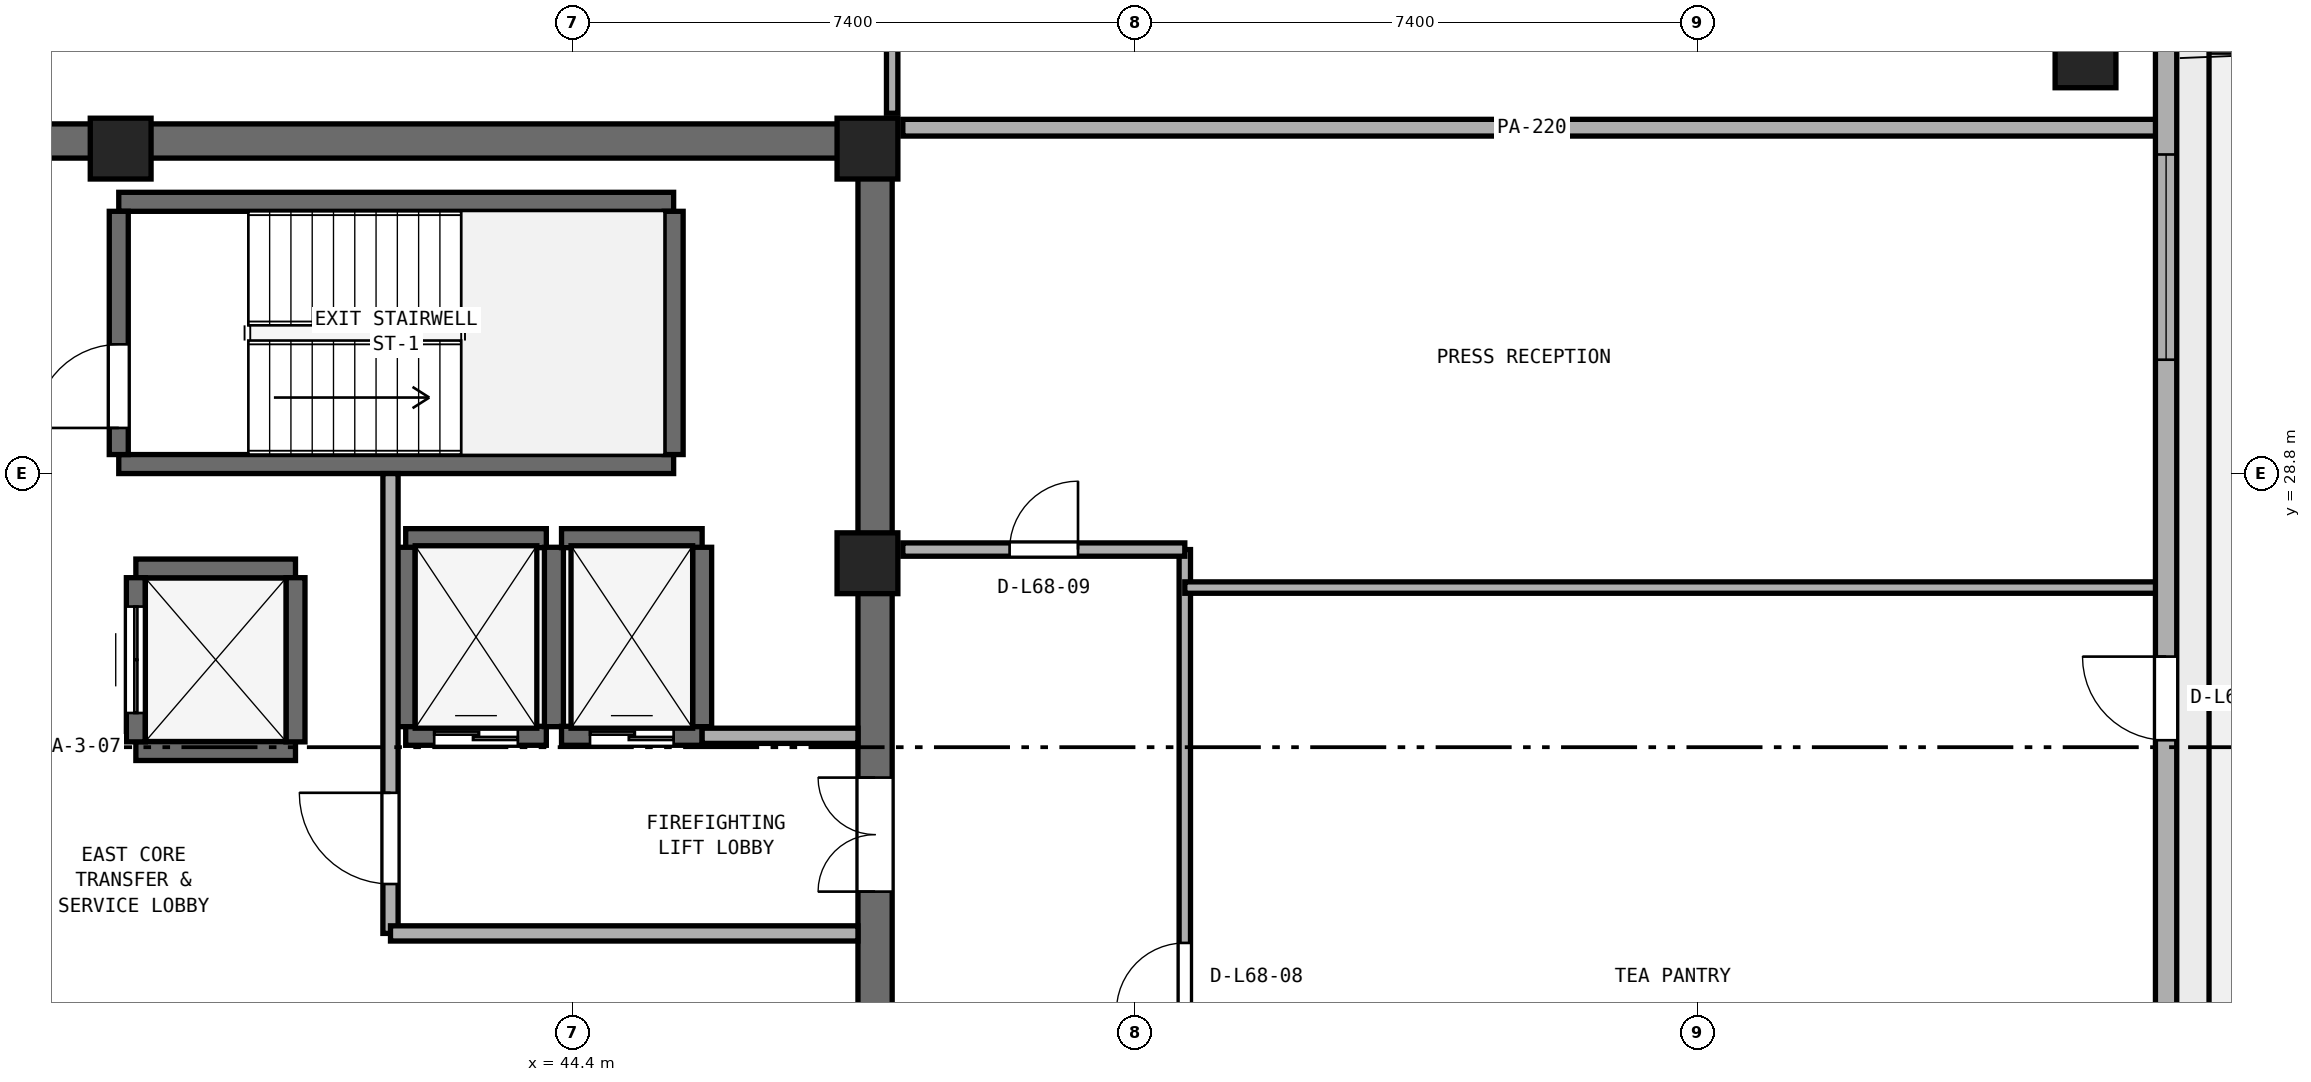
"""IFC4 building model, lengths in metres.
Left out: names, types, materials, properties, quantities, classifications, styles, units other than length and angle.
Written with IfcOpenShell. Run it as: python <this file> out.ifc"""

import sys

from ifc_helpers import new_model, si_unit, direction, frame, frame_2d, origin, origin_2d, place, context, subcontext, project, spatial, rectangle, extrude, element, fill, save


model = new_model("IFC4")
c1 = context("Model", 3, precision=1e-05, world=origin(), true_north=direction((0.0, 1.0)))
c2 = subcontext(c1, "Body", "Model", "MODEL_VIEW")
j1 = project(units=[si_unit("LENGTHUNIT", "METRE"), si_unit("PLANEANGLEUNIT", "RADIAN")], contexts=[c1])
p1 = place(None, origin())
s1 = spatial("IfcSite", under=j1, at=p1, CompositionType="ELEMENT")
p2 = place(p1, origin())
s2 = spatial("IfcBuilding", under=s1, at=p2, CompositionType="ELEMENT")
p3 = place(p2, frame((0.0, 0.0, 266.8)))
s3 = spatial("IfcBuildingStorey", under=s2, at=p3, CompositionType="ELEMENT", Elevation=266.8)
p4 = place(p3, frame((25.4, 33.175, 0.0), z_axis=(0.0, 0.0, 1.0), x_axis=(1.0, 0.0, 0.0)))
e1 = element("IfcWall", 1, at=p4, inside=s3, PredefinedType="SHEAR", context=c2, shape_type="SweptSolid", body=[
    extrude(rectangle(XDim=23.2, YDim=0.45, at=frame_2d((11.6, 0.0))), origin(), (0.0, 0.0, 1.0), 3.51),
])
p5 = place(p3, frame((48.375, 17.45, 0.0), z_axis=(0.0, 0.0, 1.0), x_axis=(0.0, 1.0, 0.0)))
e2 = element("IfcWall", 2, at=p5, inside=s3, PredefinedType="SHEAR", context=c2, shape_type="SweptSolid", body=[
    extrude(rectangle(XDim=15.5, YDim=0.45, at=frame_2d((7.75, 0.0))), origin(), (0.0, 0.0, 1.0), 3.51),
])
p6 = place(p5, frame((5.85, 0.0, 0.0)))
e3 = element("IfcOpeningElement", 3, at=p6, cuts=e2, PredefinedType="OPENING", context=c2, shape_type="SweptSolid", body=[
    extrude(rectangle(XDim=1.5, YDim=2.15, at=frame_2d((0.75, 1.075))), frame((0.0, 0.235, 0.0), z_axis=(0.0, -1.0, 0.0), x_axis=(1.0, 0.0, 0.0)), (0.0, 0.0, 1.0), 0.47),
])
for number, where, z_axis, x_axis in (
    (4, (48.275, 27.62, 0.0), (0.0, 0.0, 1.0), (1.0, 0.0, 0.0)),
    (5, (48.275, 33.075, 0.0), (0.0, 0.0, 1.0), (1.0, 0.0, 0.0)),
    (6, (38.45, 33.075, 0.0), (0.0, 0.0, 1.0), (1.0, 0.0, 0.0)),
):
    element("IfcColumn", number, at=place(p3, frame(where, z_axis=z_axis, x_axis=x_axis)), inside=s3, PredefinedType="PILASTER", context=c2, shape_type="SweptSolid", body=[
        extrude(rectangle(XDim=0.8, YDim=0.8, at=origin_2d()), origin(), (0.0, 0.0, 1.0), 3.8),
    ])
p7 = place(p3, frame((64.3, 34.276, 0.0), z_axis=(0.0, 0.0, 1.0), x_axis=(1.0, 0.0, 0.0)))
e7 = element("IfcColumn", 7, at=p7, inside=s3, PredefinedType="COLUMN", context=c2, shape_type="SweptSolid", body=[
    extrude(rectangle(XDim=0.8, YDim=0.8, at=origin_2d()), origin(), (0.0, 0.0, 1.0), 3.8),
])
for number, where, z_axis, x_axis in (
    (8, (38.425, 28.925, 0.0), (0.0, 0.0, 1.0), (1.0, 0.0, 0.0)),
    (9, (38.425, 32.375, 0.0), (0.0, 0.0, 1.0), (1.0, 0.0, 0.0)),
):
    element("IfcWall", number, at=place(p3, frame(where, z_axis=z_axis, x_axis=x_axis)), inside=s3, PredefinedType="SHEAR", context=c2, shape_type="SweptSolid", body=[
        extrude(rectangle(XDim=7.3, YDim=0.25, at=frame_2d((3.65, 0.0))), origin(), (0.0, 0.0, 1.0), 3.51),
    ])
p8 = place(p3, frame((38.425, 29.05, 0.0), z_axis=(0.0, 0.0, 1.0), x_axis=(0.0, 1.0, 0.0)))
e10 = element("IfcWall", 10, at=p8, inside=s3, PredefinedType="SHEAR", context=c2, shape_type="SweptSolid", body=[
    extrude(rectangle(XDim=3.2, YDim=0.25, at=frame_2d((1.6, 0.0))), origin(), (0.0, 0.0, 1.0), 3.51),
])
p9 = place(p8, frame((0.35, 0.0, 0.0)))
e11 = element("IfcOpeningElement", 11, at=p9, cuts=e10, PredefinedType="OPENING", context=c2, shape_type="SweptSolid", body=[
    extrude(rectangle(XDim=1.1, YDim=2.15, at=frame_2d((0.55, 1.075))), frame((0.0, 0.135, 0.0), z_axis=(0.0, -1.0, 0.0), x_axis=(1.0, 0.0, 0.0)), (0.0, 0.0, 1.0), 0.27),
])
p10 = place(p3, frame((45.725, 29.05, 0.0), z_axis=(0.0, 0.0, 1.0), x_axis=(0.0, 1.0, 0.0)))
e12 = element("IfcWall", 12, at=p10, inside=s3, PredefinedType="SHEAR", context=c2, shape_type="SweptSolid", body=[
    extrude(rectangle(XDim=3.2, YDim=0.25, at=frame_2d((1.6, 0.0))), origin(), (0.0, 0.0, 1.0), 3.51),
])
p11 = place(p3, frame((42.2, 25.35, 0.0), z_axis=(0.0, 0.0, 1.0), x_axis=(1.0, 0.0, 0.0)))
e13 = element("IfcWall", 13, at=p11, inside=s3, PredefinedType="SHEAR", context=c2, shape_type="SweptSolid", body=[
    extrude(rectangle(XDim=1.85, YDim=0.25, at=frame_2d((0.925, 0.0))), origin(), (0.0, 0.0, 1.0), 3.51),
])
p12 = place(p11, frame((0.375, 0.0, 0.0)))
e14 = element("IfcOpeningElement", 14, at=p12, cuts=e13, PredefinedType="OPENING", context=c2, shape_type="SweptSolid", body=[
    extrude(rectangle(XDim=1.1, YDim=2.15, at=frame_2d((0.55, 1.075))), frame((0.0, 0.135, 0.0), z_axis=(0.0, -1.0, 0.0), x_axis=(1.0, 0.0, 0.0)), (0.0, 0.0, 1.0), 0.27),
])
p13 = place(p3, frame((42.2, 27.95, 0.0), z_axis=(0.0, 0.0, 1.0), x_axis=(1.0, 0.0, 0.0)))
e15 = element("IfcWall", 15, at=p13, inside=s3, PredefinedType="SHEAR", context=c2, shape_type="SweptSolid", body=[
    extrude(rectangle(XDim=1.85, YDim=0.25, at=frame_2d((0.925, 0.0))), origin(), (0.0, 0.0, 1.0), 3.51),
])
for number, where, z_axis, x_axis in (
    (16, (42.2, 25.47, 0.0), (0.0, 0.0, 1.0), (0.0, 1.0, 0.0)),
    (17, (44.15, 25.47, 0.0), (0.0, 0.0, 1.0), (0.0, 1.0, 0.0)),
):
    element("IfcWall", number, at=place(p3, frame(where, z_axis=z_axis, x_axis=x_axis)), inside=s3, PredefinedType="SHEAR", context=c2, shape_type="SweptSolid", body=[
        extrude(rectangle(XDim=2.36, YDim=0.25, at=frame_2d((1.18, 0.0))), origin(), (0.0, 0.0, 1.0), 3.51),
    ])
p14 = place(p3, frame((44.25, 25.35, 0.0), z_axis=(0.0, 0.0, 1.0), x_axis=(1.0, 0.0, 0.0)))
e18 = element("IfcWall", 18, at=p14, inside=s3, PredefinedType="SHEAR", context=c2, shape_type="SweptSolid", body=[
    extrude(rectangle(XDim=1.85, YDim=0.25, at=frame_2d((0.925, 0.0))), origin(), (0.0, 0.0, 1.0), 3.51),
])
p15 = place(p14, frame((0.375, 0.0, 0.0)))
e19 = element("IfcOpeningElement", 19, at=p15, cuts=e18, PredefinedType="OPENING", context=c2, shape_type="SweptSolid", body=[
    extrude(rectangle(XDim=1.1, YDim=2.15, at=frame_2d((0.55, 1.075))), frame((0.0, 0.135, 0.0), z_axis=(0.0, -1.0, 0.0), x_axis=(1.0, 0.0, 0.0)), (0.0, 0.0, 1.0), 0.27),
])
p16 = place(p3, frame((44.25, 27.95, 0.0), z_axis=(0.0, 0.0, 1.0), x_axis=(1.0, 0.0, 0.0)))
e20 = element("IfcWall", 20, at=p16, inside=s3, PredefinedType="SHEAR", context=c2, shape_type="SweptSolid", body=[
    extrude(rectangle(XDim=1.85, YDim=0.25, at=frame_2d((0.925, 0.0))), origin(), (0.0, 0.0, 1.0), 3.51),
])
p17 = place(p3, frame((46.1, 25.47, 0.0), z_axis=(0.0, 0.0, 1.0), x_axis=(0.0, 1.0, 0.0)))
e21 = element("IfcWall", 21, at=p17, inside=s3, PredefinedType="SHEAR", context=c2, shape_type="SweptSolid", body=[
    extrude(rectangle(XDim=2.36, YDim=0.25, at=frame_2d((1.18, 0.0))), origin(), (0.0, 0.0, 1.0), 3.51),
])
for number, where, z_axis, x_axis in (
    (22, (38.65, 25.15, 0.0), (0.0, 0.0, 1.0), (1.0, 0.0, 0.0)),
    (23, (38.65, 27.55, 0.0), (0.0, 0.0, 1.0), (1.0, 0.0, 0.0)),
):
    element("IfcWall", number, at=place(p3, frame(where, z_axis=z_axis, x_axis=x_axis)), inside=s3, PredefinedType="SHEAR", context=c2, shape_type="SweptSolid", body=[
        extrude(rectangle(XDim=2.1, YDim=0.25, at=frame_2d((1.05, 0.0))), origin(), (0.0, 0.0, 1.0), 3.51),
    ])
p18 = place(p3, frame((38.65, 25.27, 0.0), z_axis=(0.0, 0.0, 1.0), x_axis=(0.0, 1.0, 0.0)))
e24 = element("IfcWall", 24, at=p18, inside=s3, PredefinedType="SHEAR", context=c2, shape_type="SweptSolid", body=[
    extrude(rectangle(XDim=2.16, YDim=0.25, at=frame_2d((1.08, 0.0))), origin(), (0.0, 0.0, 1.0), 3.51),
])
p19 = place(p18, frame((0.38, 0.0, 0.0)))
e25 = element("IfcOpeningElement", 25, at=p19, cuts=e24, PredefinedType="OPENING", context=c2, shape_type="SweptSolid", body=[
    extrude(rectangle(XDim=1.4, YDim=2.2, at=frame_2d((0.7, 1.1))), frame((0.0, 0.135, 0.0), z_axis=(0.0, -1.0, 0.0), x_axis=(1.0, 0.0, 0.0)), (0.0, 0.0, 1.0), 0.27),
])
p20 = place(p3, frame((40.75, 25.27, 0.0), z_axis=(0.0, 0.0, 1.0), x_axis=(0.0, 1.0, 0.0)))
e26 = element("IfcWall", 26, at=p20, inside=s3, PredefinedType="SHEAR", context=c2, shape_type="SweptSolid", body=[
    extrude(rectangle(XDim=2.16, YDim=0.25, at=frame_2d((1.08, 0.0))), origin(), (0.0, 0.0, 1.0), 3.51),
])
p21 = place(p3, frame((42.0, 22.75, 0.0), z_axis=(0.0, 0.0, 1.0), x_axis=(0.0, 1.0, 0.0)))
e27 = element("IfcWall", 27, at=p21, inside=s3, PredefinedType="SOLIDWALL", context=c2, shape_type="SweptSolid", body=[
    extrude(rectangle(XDim=6.05, YDim=0.2, at=frame_2d((3.025, 0.0))), origin(), (0.0, 0.0, 1.0), 3.51),
])
p22 = place(p21, frame((0.65, 0.0, 0.0)))
e28 = element("IfcOpeningElement", 28, at=p22, cuts=e27, PredefinedType="OPENING", context=c2, shape_type="SweptSolid", body=[
    extrude(rectangle(XDim=1.2, YDim=2.15, at=frame_2d((0.6, 1.075))), frame((0.0, 0.11, 0.0), z_axis=(0.0, -1.0, 0.0), x_axis=(1.0, 0.0, 0.0)), (0.0, 0.0, 1.0), 0.22),
])
p23 = place(p3, frame((42.0, 22.75, 0.0), z_axis=(0.0, 0.0, 1.0), x_axis=(1.0, 0.0, 0.0)))
e29 = element("IfcWall", 29, at=p23, inside=s3, PredefinedType="SOLIDWALL", context=c2, shape_type="SweptSolid", body=[
    extrude(rectangle(XDim=6.15, YDim=0.2, at=frame_2d((3.075, 0.0))), origin(), (0.0, 0.0, 1.0), 3.51),
])
p24 = place(p3, frame((46.1, 25.35, 0.0), z_axis=(0.0, 0.0, 1.0), x_axis=(1.0, 0.0, 0.0)))
e30 = element("IfcWall", 30, at=p24, inside=s3, PredefinedType="SOLIDWALL", context=c2, shape_type="SweptSolid", body=[
    extrude(rectangle(XDim=2.05, YDim=0.2, at=frame_2d((1.025, 0.0))), origin(), (0.0, 0.0, 1.0), 3.51),
])
p25 = place(p3, frame((52.45, 13.15, 0.0), z_axis=(0.0, 0.0, 1.0), x_axis=(0.0, 1.0, 0.0)))
e31 = element("IfcWall", 31, at=p25, inside=s3, PredefinedType="PARTITIONING", context=c2, shape_type="SweptSolid", body=[
    extrude(rectangle(XDim=14.65, YDim=0.15, at=frame_2d((7.325, 0.0))), origin(), (0.0, 0.0, 1.0), 3.51),
])
p26 = place(p25, frame((8.575, 0.0, 0.0)))
e32 = element("IfcOpeningElement", 32, at=p26, cuts=e31, PredefinedType="OPENING", context=c2, shape_type="SweptSolid", body=[
    extrude(rectangle(XDim=0.9, YDim=2.1, at=frame_2d((0.45, 1.05))), frame((0.0, 0.085, 0.0), z_axis=(0.0, -1.0, 0.0), x_axis=(1.0, 0.0, 0.0)), (0.0, 0.0, 1.0), 0.17),
])
p27 = place(p3, frame((48.6, 33.54, 0.0), z_axis=(0.0, 0.0, 1.0), x_axis=(0.0, 1.0, 0.0)))
e33 = element("IfcWall", 33, at=p27, inside=s3, PredefinedType="PARTITIONING", context=c2, shape_type="SweptSolid", body=[
    extrude(rectangle(XDim=3.71, YDim=0.15, at=frame_2d((1.855, 0.0))), origin(), (0.0, 0.0, 1.0), 2.893),
])
p28 = place(p3, frame((52.45, 27.3, 0.0), z_axis=(0.0, 0.0, 1.0), x_axis=(1.0, 0.0, 0.0)))
e34 = element("IfcWall", 34, at=p28, inside=s3, PredefinedType="PARTITIONING", context=c2, shape_type="SweptSolid", body=[
    extrude(rectangle(XDim=12.845, YDim=0.15, at=frame_2d((6.422, 0.0))), origin(), (0.0, 0.0, 1.0), 3.51),
])
p29 = place(p3, frame((48.74, 27.8, 0.0), z_axis=(0.0, 0.0, 1.0), x_axis=(1.0, 0.0, 0.0)))
e35 = element("IfcWall", 35, at=p29, inside=s3, PredefinedType="PARTITIONING", context=c2, shape_type="SweptSolid", body=[
    extrude(rectangle(XDim=3.71, YDim=0.175, at=frame_2d((1.855, 0.0))), origin(), (0.0, 0.0, 1.0), 3.51),
])
p30 = place(p29, frame((1.405, 0.0, 0.0)))
e36 = element("IfcOpeningElement", 36, at=p30, cuts=e35, PredefinedType="OPENING", context=c2, shape_type="SweptSolid", body=[
    extrude(rectangle(XDim=0.9, YDim=2.1, at=frame_2d((0.45, 1.05))), frame((0.0, 0.097, 0.0), z_axis=(0.0, -1.0, 0.0), x_axis=(1.0, 0.0, 0.0)), (0.0, 0.0, 1.0), 0.195),
])
p31 = place(p3, frame((48.74, 33.35, 0.0), z_axis=(0.0, 0.0, 1.0), x_axis=(1.0, 0.0, 0.0)))
e37 = element("IfcWall", 37, at=p31, inside=s3, PredefinedType="PARTITIONING", context=c2, shape_type="SweptSolid", body=[
    extrude(rectangle(XDim=16.555, YDim=0.22, at=frame_2d((8.277, 0.0))), origin(), (0.0, 0.0, 1.0), 2.893),
])
p32 = place(p3, frame((65.36, 16.258, 0.0), z_axis=(0.0, 0.0, 1.0), x_axis=(0.0, 1.0, 0.0)))
e38 = element("IfcWall", 38, at=p32, inside=s3, PredefinedType="STANDARD", context=c2, shape_type="SweptSolid", body=[
    extrude(rectangle(XDim=19.168, YDim=0.28, at=frame_2d((9.584, 0.0))), origin(), (0.0, 0.0, 1.0), 3.51),
])
p33 = place(p32, frame((9.034, 0.0, 0.0)))
e39 = element("IfcOpeningElement", 39, at=p33, cuts=e38, PredefinedType="OPENING", context=c2, shape_type="SweptSolid", body=[
    extrude(rectangle(XDim=1.1, YDim=2.2, at=frame_2d((0.55, 1.1))), frame((0.0, 0.15, 0.0), z_axis=(0.0, -1.0, 0.0), x_axis=(1.0, 0.0, 0.0)), (0.0, 0.0, 1.0), 0.3),
])
p34 = place(p32, frame((2.178, 0.0, 0.9)))
e40 = element("IfcOpeningElement", 40, at=p34, cuts=e38, PredefinedType="OPENING", context=c2, shape_type="SweptSolid", body=[
    extrude(rectangle(XDim=2.7, YDim=1.75, at=frame_2d((1.35, 0.875))), frame((0.0, 0.15, 0.0), z_axis=(0.0, -1.0, 0.0), x_axis=(1.0, 0.0, 0.0)), (0.0, 0.0, 1.0), 0.3),
])
p35 = place(p32, frame((14.04, 0.0, 0.9)))
e41 = element("IfcOpeningElement", 41, at=p35, cuts=e38, PredefinedType="OPENING", context=c2, shape_type="SweptSolid", body=[
    extrude(rectangle(XDim=2.7, YDim=1.75, at=frame_2d((1.35, 0.875))), frame((0.0, 0.15, 0.0), z_axis=(0.0, -1.0, 0.0), x_axis=(1.0, 0.0, 0.0)), (0.0, 0.0, 1.0), 0.3),
])
p36 = place(p9, origin())
e42 = element("IfcDoor", 42, at=p36, inside=s3, OperationType="SINGLE_SWING_LEFT", PredefinedType="DOOR", context=c2, shape_type="SweptSolid", body=[
    extrude(rectangle(XDim=1.1, YDim=2.15, at=frame_2d((0.55, 1.075))), frame((0.0, 0.025, 0.0), z_axis=(0.0, -1.0, 0.0), x_axis=(1.0, 0.0, 0.0)), (0.0, 0.0, 1.0), 0.05),
])
fill(e11, e42)
p37 = place(p12, origin())
e43 = element("IfcDoor", 43, at=p37, inside=s3, OperationType="DOUBLE_DOOR_SLIDING", PredefinedType="DOOR", context=c2, shape_type="SweptSolid", body=[
    extrude(rectangle(XDim=1.1, YDim=2.15, at=frame_2d((0.55, 1.075))), frame((0.0, 0.025, 0.0), z_axis=(0.0, -1.0, 0.0), x_axis=(1.0, 0.0, 0.0)), (0.0, 0.0, 1.0), 0.05),
])
fill(e14, e43)
p38 = place(p15, origin())
e44 = element("IfcDoor", 44, at=p38, inside=s3, OperationType="DOUBLE_DOOR_SLIDING", PredefinedType="DOOR", context=c2, shape_type="SweptSolid", body=[
    extrude(rectangle(XDim=1.1, YDim=2.15, at=frame_2d((0.55, 1.075))), frame((0.0, 0.025, 0.0), z_axis=(0.0, -1.0, 0.0), x_axis=(1.0, 0.0, 0.0)), (0.0, 0.0, 1.0), 0.05),
])
fill(e19, e44)
p39 = place(p19, origin())
e45 = element("IfcDoor", 45, at=p39, inside=s3, OperationType="DOUBLE_DOOR_SLIDING", PredefinedType="DOOR", context=c2, shape_type="SweptSolid", body=[
    extrude(rectangle(XDim=1.4, YDim=2.2, at=frame_2d((0.7, 1.1))), frame((0.0, 0.025, 0.0), z_axis=(0.0, -1.0, 0.0), x_axis=(1.0, 0.0, 0.0)), (0.0, 0.0, 1.0), 0.05),
])
fill(e25, e45)
p40 = place(p22, origin())
e46 = element("IfcDoor", 46, at=p40, inside=s3, OperationType="SINGLE_SWING_RIGHT", PredefinedType="DOOR", context=c2, shape_type="SweptSolid", body=[
    extrude(rectangle(XDim=1.2, YDim=2.15, at=frame_2d((0.6, 1.075))), frame((0.0, 0.025, 0.0), z_axis=(0.0, -1.0, 0.0), x_axis=(1.0, 0.0, 0.0)), (0.0, 0.0, 1.0), 0.05),
])
fill(e28, e46)
p41 = place(p6, origin())
e47 = element("IfcDoor", 47, at=p41, inside=s3, OperationType="DOUBLE_DOOR_SINGLE_SWING", PredefinedType="DOOR", context=c2, shape_type="SweptSolid", body=[
    extrude(rectangle(XDim=1.5, YDim=2.15, at=frame_2d((0.75, 1.075))), frame((0.0, 0.025, 0.0), z_axis=(0.0, -1.0, 0.0), x_axis=(1.0, 0.0, 0.0)), (0.0, 0.0, 1.0), 0.05),
])
fill(e3, e47)
p42 = place(p26, origin())
e48 = element("IfcDoor", 48, at=p42, inside=s3, OperationType="SINGLE_SWING_LEFT", PredefinedType="DOOR", context=c2, shape_type="SweptSolid", body=[
    extrude(rectangle(XDim=0.9, YDim=2.1, at=frame_2d((0.45, 1.05))), frame((0.0, 0.025, 0.0), z_axis=(0.0, -1.0, 0.0), x_axis=(1.0, 0.0, 0.0)), (0.0, 0.0, 1.0), 0.05),
])
fill(e32, e48)
p43 = place(p30, origin())
e49 = element("IfcDoor", 49, at=p43, inside=s3, OperationType="SINGLE_SWING_RIGHT", PredefinedType="DOOR", context=c2, shape_type="SweptSolid", body=[
    extrude(rectangle(XDim=0.9, YDim=2.1, at=frame_2d((0.45, 1.05))), frame((0.0, 0.025, 0.0), z_axis=(0.0, -1.0, 0.0), x_axis=(1.0, 0.0, 0.0)), (0.0, 0.0, 1.0), 0.05),
])
fill(e36, e49)
p44 = place(p33, origin())
e50 = element("IfcDoor", 50, at=p44, inside=s3, OperationType="SINGLE_SWING_RIGHT", PredefinedType="DOOR", context=c2, shape_type="SweptSolid", body=[
    extrude(rectangle(XDim=1.1, YDim=2.2, at=frame_2d((0.55, 1.1))), frame((0.0, 0.025, 0.0), z_axis=(0.0, -1.0, 0.0), x_axis=(1.0, 0.0, 0.0)), (0.0, 0.0, 1.0), 0.05),
])
fill(e39, e50)
p45 = place(p35, origin())
e51 = element("IfcWindow", 51, at=p45, inside=s3, PartitioningType="SINGLE_PANEL", PredefinedType="WINDOW", context=c2, shape_type="SweptSolid", body=[
    extrude(rectangle(XDim=2.7, YDim=1.75, at=frame_2d((1.35, 0.875))), frame((0.0, 0.03, 0.0), z_axis=(0.0, -1.0, 0.0), x_axis=(1.0, 0.0, 0.0)), (0.0, 0.0, 1.0), 0.06),
])
fill(e41, e51)
save(model, sys.argv[1])
